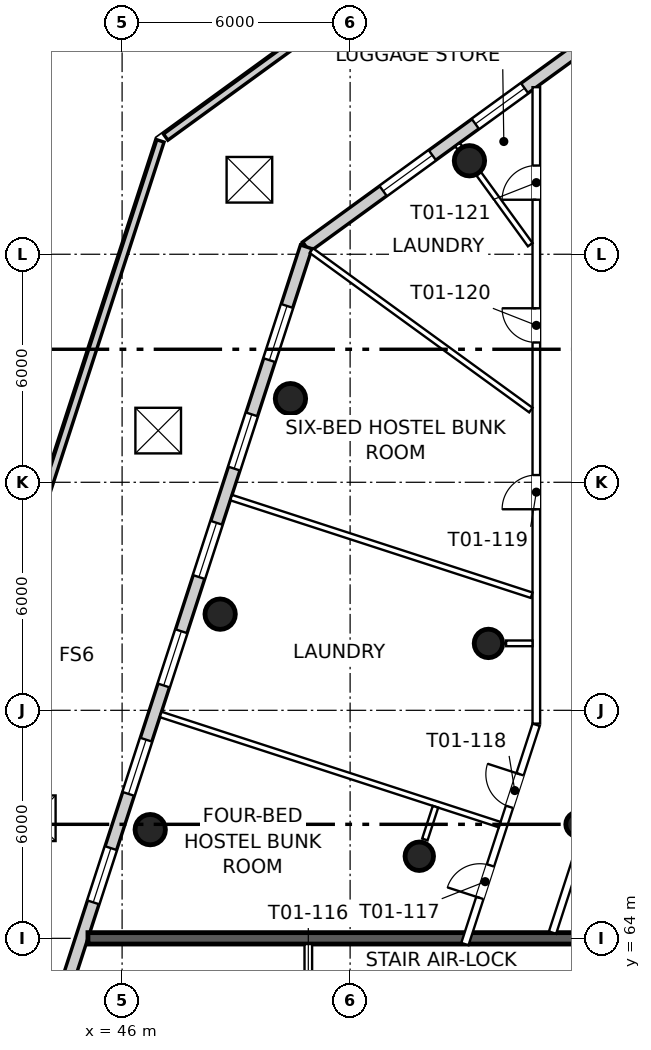
"""IFC4 building model, lengths in metres.
Left out: names, types, materials, properties, quantities, classifications, styles, units other than length and angle.
Written with IfcOpenShell. Run it as: python <this file> out.ifc"""

import sys

from ifc_helpers import new_model, si_unit, direction, frame, frame_2d, origin, origin_2d, place, context, subcontext, project, spatial, rectangle, circle, extrude, element, fill, save


model = new_model("IFC4")
c1 = context("Model", 3, precision=1e-05, world=origin(), true_north=direction((0.0, 1.0)))
c2 = subcontext(c1, "Body", "Model", "MODEL_VIEW")
j1 = project(units=[si_unit("LENGTHUNIT", "METRE"), si_unit("PLANEANGLEUNIT", "RADIAN")], contexts=[c1])
p1 = place(None, origin())
s1 = spatial("IfcSite", under=j1, at=p1, CompositionType="ELEMENT")
p2 = place(p1, origin())
s2 = spatial("IfcBuilding", under=s1, at=p2, CompositionType="ELEMENT")
p3 = place(p2, frame((0.0, 0.0, 39.0)))
s3 = spatial("IfcBuildingStorey", under=s2, at=p3, CompositionType="ELEMENT", Elevation=39.0)
for number, where, z_axis, x_axis in (
    (1, (55.14, 84.46, 0.0), (0.0, 0.0, 1.0), (1.0, 0.0, 0.0)),
    (2, (50.43, 78.2, 0.0), (0.0, 0.0, 1.0), (1.0, 0.0, 0.0)),
    (3, (48.58, 72.53, 0.0), (0.0, 0.0, 1.0), (1.0, 0.0, 0.0)),
    (4, (46.74, 66.86, 0.0), (0.0, 0.0, 1.0), (1.0, 0.0, 0.0)),
):
    element("IfcColumn", number, at=place(p3, frame(where, z_axis=z_axis, x_axis=x_axis)), inside=s3, PredefinedType="COLUMN", context=c2, shape_type="SweptSolid", body=[
        extrude(circle(Radius=0.4, at=origin_2d()), origin(), (0.0, 0.0, 1.0), 3.9),
    ])
for number, where, z_axis, x_axis in (
    (5, (55.64, 71.76, 0.0), (0.0, 0.0, 1.0), (1.0, 0.0, 0.0)),
    (6, (53.82, 66.16, 0.0), (0.0, 0.0, 1.0), (1.0, 0.0, 0.0)),
):
    element("IfcColumn", number, at=place(p3, frame(where, z_axis=z_axis, x_axis=x_axis)), inside=s3, PredefinedType="COLUMN", context=c2, shape_type="SweptSolid", body=[
        extrude(circle(Radius=0.375, at=origin_2d()), origin(), (0.0, 0.0, 1.0), 3.9),
    ])
p4 = place(p3, frame((58.0, 67.0, 0.0), z_axis=(0.0, 0.0, 1.0), x_axis=(1.0, 0.0, 0.0)))
e7 = element("IfcColumn", 7, at=p4, inside=s3, PredefinedType="COLUMN", context=c2, shape_type="SweptSolid", body=[
    extrude(circle(Radius=0.325, at=origin_2d()), origin(), (0.0, 0.0, 1.0), 3.9),
])
p5 = place(p3, frame((58.615, 87.84, 0.0), z_axis=(0.0, 0.0, 1.0), x_axis=(-0.809016299274, -0.587786209015, 0.0)))
e8 = element("IfcWall", 8, at=p5, inside=s3, PredefinedType="SOLIDWALL", context=c2, shape_type="SweptSolid", body=[
    extrude(rectangle(XDim=9.604, YDim=0.32, at=frame_2d((4.802, 0.0))), origin(), (0.0, 0.0, 1.0), 3.6),
])
p6 = place(p5, frame((2.502, 0.0, 0.9)))
e9 = element("IfcOpeningElement", 9, at=p6, cuts=e8, PredefinedType="OPENING", context=c2, shape_type="SweptSolid", body=[
    extrude(rectangle(XDim=1.6, YDim=1.8, at=frame_2d((0.8, 0.9))), frame((0.0, 0.17, 0.0), z_axis=(0.0, -1.0, 0.0), x_axis=(1.0, 0.0, 0.0)), (0.0, 0.0, 1.0), 0.34),
])
p7 = place(p5, frame((5.502, 0.0, 0.9)))
e10 = element("IfcOpeningElement", 10, at=p7, cuts=e8, PredefinedType="OPENING", context=c2, shape_type="SweptSolid", body=[
    extrude(rectangle(XDim=1.6, YDim=1.8, at=frame_2d((0.8, 0.9))), frame((0.0, 0.17, 0.0), z_axis=(0.0, -1.0, 0.0), x_axis=(1.0, 0.0, 0.0)), (0.0, 0.0, 1.0), 0.34),
])
p8 = place(p3, frame((50.845, 82.195, 0.0), z_axis=(0.0, 0.0, 1.0), x_axis=(-0.309016733543, -0.951056601045, 0.0)))
e11 = element("IfcWall", 11, at=p8, inside=s3, PredefinedType="SOLIDWALL", context=c2, shape_type="SweptSolid", body=[
    extrude(rectangle(XDim=22.77, YDim=0.32, at=frame_2d((11.385, 0.0))), origin(), (0.0, 0.0, 1.0), 3.6),
])
p9 = place(p8, frame((1.635, 0.0, 0.9)))
e12 = element("IfcOpeningElement", 12, at=p9, cuts=e11, PredefinedType="OPENING", context=c2, shape_type="SweptSolid", body=[
    extrude(rectangle(XDim=1.5, YDim=1.8, at=frame_2d((0.75, 0.9))), frame((0.0, 0.17, 0.0), z_axis=(0.0, -1.0, 0.0), x_axis=(1.0, 0.0, 0.0)), (0.0, 0.0, 1.0), 0.34),
])
p10 = place(p8, frame((4.635, 0.0, 0.9)))
e13 = element("IfcOpeningElement", 13, at=p10, cuts=e11, PredefinedType="OPENING", context=c2, shape_type="SweptSolid", body=[
    extrude(rectangle(XDim=1.5, YDim=1.8, at=frame_2d((0.75, 0.9))), frame((0.0, 0.17, 0.0), z_axis=(0.0, -1.0, 0.0), x_axis=(1.0, 0.0, 0.0)), (0.0, 0.0, 1.0), 0.34),
])
p11 = place(p8, frame((7.635, 0.0, 0.9)))
e14 = element("IfcOpeningElement", 14, at=p11, cuts=e11, PredefinedType="OPENING", context=c2, shape_type="SweptSolid", body=[
    extrude(rectangle(XDim=1.5, YDim=1.8, at=frame_2d((0.75, 0.9))), frame((0.0, 0.17, 0.0), z_axis=(0.0, -1.0, 0.0), x_axis=(1.0, 0.0, 0.0)), (0.0, 0.0, 1.0), 0.34),
])
p12 = place(p8, frame((10.635, 0.0, 0.9)))
e15 = element("IfcOpeningElement", 15, at=p12, cuts=e11, PredefinedType="OPENING", context=c2, shape_type="SweptSolid", body=[
    extrude(rectangle(XDim=1.5, YDim=1.8, at=frame_2d((0.75, 0.9))), frame((0.0, 0.17, 0.0), z_axis=(0.0, -1.0, 0.0), x_axis=(1.0, 0.0, 0.0)), (0.0, 0.0, 1.0), 0.34),
])
p13 = place(p8, frame((13.635, 0.0, 0.9)))
e16 = element("IfcOpeningElement", 16, at=p13, cuts=e11, PredefinedType="OPENING", context=c2, shape_type="SweptSolid", body=[
    extrude(rectangle(XDim=1.5, YDim=1.8, at=frame_2d((0.75, 0.9))), frame((0.0, 0.17, 0.0), z_axis=(0.0, -1.0, 0.0), x_axis=(1.0, 0.0, 0.0)), (0.0, 0.0, 1.0), 0.34),
])
p14 = place(p8, frame((16.635, 0.0, 0.9)))
e17 = element("IfcOpeningElement", 17, at=p14, cuts=e11, PredefinedType="OPENING", context=c2, shape_type="SweptSolid", body=[
    extrude(rectangle(XDim=1.5, YDim=1.8, at=frame_2d((0.75, 0.9))), frame((0.0, 0.17, 0.0), z_axis=(0.0, -1.0, 0.0), x_axis=(1.0, 0.0, 0.0)), (0.0, 0.0, 1.0), 0.34),
])
p15 = place(p3, frame((39.119, 60.701, 0.0), z_axis=(0.0, 0.0, 1.0), x_axis=(0.309015149374, 0.95105711577, 0.0)))
e18 = element("IfcWall", 18, at=p15, inside=s3, PredefinedType="SOLIDWALL", context=c2, shape_type="SweptSolid", body=[
    extrude(rectangle(XDim=25.531, YDim=0.2, at=frame_2d((12.765, 0.0))), origin(), (0.0, 0.0, 1.0), 1.1),
])
p16 = place(p3, frame((47.146, 85.082, 0.0), z_axis=(0.0, 0.0, 1.0), x_axis=(0.808991590486, 0.587820216158, 0.0)))
e19 = element("IfcWall", 19, at=p16, inside=s3, PredefinedType="SOLIDWALL", context=c2, shape_type="SweptSolid", body=[
    extrude(rectangle(XDim=4.709, YDim=0.2, at=frame_2d((2.354, 0.0))), origin(), (0.0, 0.0, 1.0), 1.1),
])
p17 = place(p3, frame((45.101, 64.0, 0.0), z_axis=(0.0, 0.0, 1.0), x_axis=(1.0, 0.0, 0.0)))
e20 = element("IfcWall", 20, at=p17, inside=s3, PredefinedType="PARTITIONING", context=c2, shape_type="SweptSolid", body=[
    extrude(rectangle(XDim=49.797, YDim=0.3, at=frame_2d((24.899, 0.0))), origin(), (0.0, 0.0, 1.0), 2.9),
])
p18 = place(p17, frame((16.433, 0.0, 0.0)))
e21 = element("IfcOpeningElement", 21, at=p18, cuts=e20, PredefinedType="OPENING", context=c2, shape_type="SweptSolid", body=[
    extrude(rectangle(XDim=2.0, YDim=2.1, at=frame_2d((1.0, 1.05))), frame((0.0, 0.16, 0.0), z_axis=(0.0, -1.0, 0.0), x_axis=(1.0, 0.0, 0.0)), (0.0, 0.0, 1.0), 0.32),
])
p19 = place(p17, frame((31.364, 0.0, 0.0)))
e22 = element("IfcOpeningElement", 22, at=p19, cuts=e20, PredefinedType="OPENING", context=c2, shape_type="SweptSolid", body=[
    extrude(rectangle(XDim=2.0, YDim=2.1, at=frame_2d((1.0, 1.05))), frame((0.0, 0.16, 0.0), z_axis=(0.0, -1.0, 0.0), x_axis=(1.0, 0.0, 0.0)), (0.0, 0.0, 1.0), 0.32),
])
p20 = place(p3, frame((55.021, 63.85, 0.0), z_axis=(0.0, 0.0, 1.0), x_axis=(0.309010538589, 0.951058613883, 0.0)))
e23 = element("IfcWall", 23, at=p20, inside=s3, PredefinedType="PARTITIONING", context=c2, shape_type="SweptSolid", body=[
    extrude(rectangle(XDim=6.066, YDim=0.2, at=frame_2d((3.033, 0.0))), origin(), (0.0, 0.0, 1.0), 3.6),
])
p21 = place(p20, frame((1.276, 0.0, 0.0)))
e24 = element("IfcOpeningElement", 24, at=p21, cuts=e23, PredefinedType="OPENING", context=c2, shape_type="SweptSolid", body=[
    extrude(rectangle(XDim=0.9, YDim=2.1, at=frame_2d((0.45, 1.05))), frame((0.0, 0.11, 0.0), z_axis=(0.0, -1.0, 0.0), x_axis=(1.0, 0.0, 0.0)), (0.0, 0.0, 1.0), 0.22),
])
p22 = place(p20, frame((3.796, 0.0, 0.0)))
e25 = element("IfcOpeningElement", 25, at=p22, cuts=e23, PredefinedType="OPENING", context=c2, shape_type="SweptSolid", body=[
    extrude(rectangle(XDim=0.9, YDim=2.1, at=frame_2d((0.45, 1.05))), frame((0.0, 0.11, 0.0), z_axis=(0.0, -1.0, 0.0), x_axis=(1.0, 0.0, 0.0)), (0.0, 0.0, 1.0), 0.22),
])
p23 = place(p3, frame((56.9, 69.65, 0.0), z_axis=(0.0, 0.0, 1.0), x_axis=(0.0, 1.0, 0.0)))
e26 = element("IfcWall", 26, at=p23, inside=s3, PredefinedType="PARTITIONING", context=c2, shape_type="SweptSolid", body=[
    extrude(rectangle(XDim=16.746, YDim=0.2, at=frame_2d((8.373, 0.0))), origin(), (0.0, 0.0, 1.0), 3.0),
])
p24 = place(p23, frame((5.64, 0.0, 0.0)))
e27 = element("IfcOpeningElement", 27, at=p24, cuts=e26, PredefinedType="OPENING", context=c2, shape_type="SweptSolid", body=[
    extrude(rectangle(XDim=0.9, YDim=2.1, at=frame_2d((0.45, 1.05))), frame((0.0, 0.11, 0.0), z_axis=(0.0, -1.0, 0.0), x_axis=(1.0, 0.0, 0.0)), (0.0, 0.0, 1.0), 0.22),
])
p25 = place(p23, frame((10.028, 0.0, 0.0)))
e28 = element("IfcOpeningElement", 28, at=p25, cuts=e26, PredefinedType="OPENING", context=c2, shape_type="SweptSolid", body=[
    extrude(rectangle(XDim=0.9, YDim=2.1, at=frame_2d((0.45, 1.05))), frame((0.0, 0.11, 0.0), z_axis=(0.0, -1.0, 0.0), x_axis=(1.0, 0.0, 0.0)), (0.0, 0.0, 1.0), 0.22),
])
p26 = place(p23, frame((13.784, 0.0, 0.0)))
e29 = element("IfcOpeningElement", 29, at=p26, cuts=e26, PredefinedType="OPENING", context=c2, shape_type="SweptSolid", body=[
    extrude(rectangle(XDim=0.9, YDim=2.1, at=frame_2d((0.45, 1.05))), frame((0.0, 0.11, 0.0), z_axis=(0.0, -1.0, 0.0), x_axis=(1.0, 0.0, 0.0)), (0.0, 0.0, 1.0), 0.22),
])
p27 = place(p3, frame((50.9, 55.9, 0.0), z_axis=(0.0, 0.0, 1.0), x_axis=(0.0, 1.0, 0.0)))
e30 = element("IfcWall", 30, at=p27, inside=s3, PredefinedType="PARTITIONING", context=c2, shape_type="SweptSolid", body=[
    extrude(rectangle(XDim=7.95, YDim=0.2, at=frame_2d((3.975, 0.0))), origin(), (0.0, 0.0, 1.0), 3.6),
])
p28 = place(p27, frame((1.82, 0.0, 0.0)))
e31 = element("IfcOpeningElement", 31, at=p28, cuts=e30, PredefinedType="OPENING", context=c2, shape_type="SweptSolid", body=[
    extrude(rectangle(XDim=0.9, YDim=2.1, at=frame_2d((0.45, 1.05))), frame((0.0, 0.11, 0.0), z_axis=(0.0, -1.0, 0.0), x_axis=(1.0, 0.0, 0.0)), (0.0, 0.0, 1.0), 0.22),
])
p29 = place(p27, frame((5.882, 0.0, 0.0)))
e32 = element("IfcOpeningElement", 32, at=p29, cuts=e30, PredefinedType="OPENING", context=c2, shape_type="SweptSolid", body=[
    extrude(rectangle(XDim=0.9, YDim=2.1, at=frame_2d((0.45, 1.05))), frame((0.0, 0.11, 0.0), z_axis=(0.0, -1.0, 0.0), x_axis=(1.0, 0.0, 0.0)), (0.0, 0.0, 1.0), 0.22),
])
p30 = place(p3, frame((58.847, 68.831, 0.0), z_axis=(0.0, 0.0, 1.0), x_axis=(-0.309031112369, -0.951051928965, 0.0)))
e33 = element("IfcWall", 33, at=p30, inside=s3, PredefinedType="PARTITIONING", context=c2, shape_type="SweptSolid", body=[
    extrude(rectangle(XDim=4.922, YDim=0.2, at=frame_2d((2.461, 0.0))), origin(), (0.0, 0.0, 1.0), 3.6),
])
p31 = place(p3, frame((50.981, 82.096, 0.0), z_axis=(0.0, 0.0, 1.0), x_axis=(0.808999272552, -0.587809643516, 0.0)))
e34 = element("IfcWall", 34, at=p31, inside=s3, PredefinedType="PARTITIONING", context=c2, shape_type="SweptSolid", body=[
    extrude(rectangle(XDim=7.138, YDim=0.15, at=frame_2d((3.569, 0.0))), origin(), (0.0, 0.0, 1.0), 3.1),
])
p32 = place(p3, frame((54.824, 84.888, 0.0), z_axis=(0.0, 0.0, 1.0), x_axis=(0.587775139739, -0.809024341479, 0.0)))
e35 = element("IfcWall", 35, at=p32, inside=s3, PredefinedType="PARTITIONING", context=c2, shape_type="SweptSolid", body=[
    extrude(rectangle(XDim=3.259, YDim=0.15, at=frame_2d((1.629, 0.0))), origin(), (0.0, 0.0, 1.0), 3.6),
])
p33 = place(p3, frame((48.87, 75.597, 0.0), z_axis=(0.0, 0.0, 1.0), x_axis=(0.95105219364, -0.309030297822, 0.0)))
e36 = element("IfcWall", 36, at=p33, inside=s3, PredefinedType="PARTITIONING", context=c2, shape_type="SweptSolid", body=[
    extrude(rectangle(XDim=8.314, YDim=0.15, at=frame_2d((4.157, 0.0))), origin(), (0.0, 0.0, 1.0), 3.1),
])
p34 = place(p3, frame((47.015, 69.891, 0.0), z_axis=(0.0, 0.0, 1.0), x_axis=(0.951060843481, -0.309003676349, 0.0)))
e37 = element("IfcWall", 37, at=p34, inside=s3, PredefinedType="PARTITIONING", context=c2, shape_type="SweptSolid", body=[
    extrude(rectangle(XDim=9.38, YDim=0.15, at=frame_2d((4.69, 0.0))), origin(), (0.0, 0.0, 1.0), 3.0),
])
p35 = place(p3, frame((56.105, 71.762, 0.0), z_axis=(0.0, 0.0, 1.0), x_axis=(1.0, 0.0, 0.0)))
e38 = element("IfcWall", 38, at=p35, inside=s3, PredefinedType="PARTITIONING", context=c2, shape_type="SweptSolid", body=[
    extrude(rectangle(XDim=0.695, YDim=0.15, at=frame_2d((0.348, 0.0))), origin(), (0.0, 0.0, 1.0), 3.0),
])
p36 = place(p3, frame((53.967, 66.601, 0.0), z_axis=(0.0, 0.0, 1.0), x_axis=(0.308939772629, 0.951081603695, 0.0)))
e39 = element("IfcWall", 39, at=p36, inside=s3, PredefinedType="PARTITIONING", context=c2, shape_type="SweptSolid", body=[
    extrude(rectangle(XDim=0.906, YDim=0.15, at=frame_2d((0.453, 0.0))), origin(), (0.0, 0.0, 1.0), 3.0),
])
p37 = place(p6, origin())
e40 = element("IfcWindow", 40, at=p37, inside=s3, PartitioningType="SINGLE_PANEL", PredefinedType="WINDOW", context=c2, shape_type="SweptSolid", body=[
    extrude(rectangle(XDim=1.6, YDim=1.8, at=frame_2d((0.8, 0.9))), frame((0.0, 0.07, 0.0), z_axis=(0.0, -1.0, 0.0), x_axis=(1.0, 0.0, 0.0)), (0.0, 0.0, 1.0), 0.06),
])
fill(e9, e40)
p38 = place(p7, origin())
e41 = element("IfcWindow", 41, at=p38, inside=s3, PartitioningType="SINGLE_PANEL", PredefinedType="WINDOW", context=c2, shape_type="SweptSolid", body=[
    extrude(rectangle(XDim=1.6, YDim=1.8, at=frame_2d((0.8, 0.9))), frame((0.0, 0.07, 0.0), z_axis=(0.0, -1.0, 0.0), x_axis=(1.0, 0.0, 0.0)), (0.0, 0.0, 1.0), 0.06),
])
fill(e10, e41)
p39 = place(p9, origin())
e42 = element("IfcWindow", 42, at=p39, inside=s3, PartitioningType="SINGLE_PANEL", PredefinedType="WINDOW", context=c2, shape_type="SweptSolid", body=[
    extrude(rectangle(XDim=1.5, YDim=1.8, at=frame_2d((0.75, 0.9))), frame((0.0, 0.07, 0.0), z_axis=(0.0, -1.0, 0.0), x_axis=(1.0, 0.0, 0.0)), (0.0, 0.0, 1.0), 0.06),
])
fill(e12, e42)
p40 = place(p10, origin())
e43 = element("IfcWindow", 43, at=p40, inside=s3, PartitioningType="SINGLE_PANEL", PredefinedType="WINDOW", context=c2, shape_type="SweptSolid", body=[
    extrude(rectangle(XDim=1.5, YDim=1.8, at=frame_2d((0.75, 0.9))), frame((0.0, 0.07, 0.0), z_axis=(0.0, -1.0, 0.0), x_axis=(1.0, 0.0, 0.0)), (0.0, 0.0, 1.0), 0.06),
])
fill(e13, e43)
p41 = place(p11, origin())
e44 = element("IfcWindow", 44, at=p41, inside=s3, PartitioningType="SINGLE_PANEL", PredefinedType="WINDOW", context=c2, shape_type="SweptSolid", body=[
    extrude(rectangle(XDim=1.5, YDim=1.8, at=frame_2d((0.75, 0.9))), frame((0.0, 0.07, 0.0), z_axis=(0.0, -1.0, 0.0), x_axis=(1.0, 0.0, 0.0)), (0.0, 0.0, 1.0), 0.06),
])
fill(e14, e44)
p42 = place(p12, origin())
e45 = element("IfcWindow", 45, at=p42, inside=s3, PartitioningType="SINGLE_PANEL", PredefinedType="WINDOW", context=c2, shape_type="SweptSolid", body=[
    extrude(rectangle(XDim=1.5, YDim=1.8, at=frame_2d((0.75, 0.9))), frame((0.0, 0.07, 0.0), z_axis=(0.0, -1.0, 0.0), x_axis=(1.0, 0.0, 0.0)), (0.0, 0.0, 1.0), 0.06),
])
fill(e15, e45)
p43 = place(p13, origin())
e46 = element("IfcWindow", 46, at=p43, inside=s3, PartitioningType="SINGLE_PANEL", PredefinedType="WINDOW", context=c2, shape_type="SweptSolid", body=[
    extrude(rectangle(XDim=1.5, YDim=1.8, at=frame_2d((0.75, 0.9))), frame((0.0, 0.07, 0.0), z_axis=(0.0, -1.0, 0.0), x_axis=(1.0, 0.0, 0.0)), (0.0, 0.0, 1.0), 0.06),
])
fill(e16, e46)
p44 = place(p14, origin())
e47 = element("IfcWindow", 47, at=p44, inside=s3, PartitioningType="SINGLE_PANEL", PredefinedType="WINDOW", context=c2, shape_type="SweptSolid", body=[
    extrude(rectangle(XDim=1.5, YDim=1.8, at=frame_2d((0.75, 0.9))), frame((0.0, 0.07, 0.0), z_axis=(0.0, -1.0, 0.0), x_axis=(1.0, 0.0, 0.0)), (0.0, 0.0, 1.0), 0.06),
])
fill(e17, e47)
p45 = place(p3, frame((0.0, 0.0, -0.4)))
p46 = place(p45, frame((43.65, 67.16, 0.0)))
p47 = place(p46, frame((0.0, 0.0, 0.35)))
e48 = element("IfcWindow", 48, at=p47, inside=s3, PartitioningType="SINGLE_PANEL", PredefinedType="SKYLIGHT", context=c2, shape_type="SweptSolid", body=[
    extrude(rectangle(XDim=1.2, YDim=1.2, at=origin_2d()), origin(), (0.0, 0.0, 1.0), 0.05),
])
p48 = place(p45, frame((46.95, 77.36, 0.0)))
p49 = place(p48, frame((0.0, 0.0, 0.35)))
e49 = element("IfcWindow", 49, at=p49, inside=s3, PartitioningType="SINGLE_PANEL", PredefinedType="SKYLIGHT", context=c2, shape_type="SweptSolid", body=[
    extrude(rectangle(XDim=1.2, YDim=1.2, at=origin_2d()), origin(), (0.0, 0.0, 1.0), 0.05),
])
p50 = place(p45, frame((49.35, 83.96, 0.0)))
p51 = place(p50, frame((0.0, 0.0, 0.35)))
e50 = element("IfcWindow", 50, at=p51, inside=s3, PartitioningType="SINGLE_PANEL", PredefinedType="SKYLIGHT", context=c2, shape_type="SweptSolid", body=[
    extrude(rectangle(XDim=1.2, YDim=1.2, at=origin_2d()), origin(), (0.0, 0.0, 1.0), 0.05),
])
p52 = place(p21, origin())
e51 = element("IfcDoor", 51, at=p52, inside=s3, OperationType="SINGLE_SWING_LEFT", PredefinedType="DOOR", context=c2, shape_type="SweptSolid", body=[
    extrude(rectangle(XDim=0.9, YDim=2.1, at=frame_2d((0.45, 1.05))), frame((0.0, 0.025, 0.0), z_axis=(0.0, -1.0, 0.0), x_axis=(1.0, 0.0, 0.0)), (0.0, 0.0, 1.0), 0.05),
])
fill(e24, e51)
p53 = place(p22, origin())
e52 = element("IfcDoor", 52, at=p53, inside=s3, OperationType="SINGLE_SWING_RIGHT", PredefinedType="DOOR", context=c2, shape_type="SweptSolid", body=[
    extrude(rectangle(XDim=0.9, YDim=2.1, at=frame_2d((0.45, 1.05))), frame((0.0, 0.025, 0.0), z_axis=(0.0, -1.0, 0.0), x_axis=(1.0, 0.0, 0.0)), (0.0, 0.0, 1.0), 0.05),
])
fill(e25, e52)
p54 = place(p24, origin())
e53 = element("IfcDoor", 53, at=p54, inside=s3, OperationType="SINGLE_SWING_LEFT", PredefinedType="DOOR", context=c2, shape_type="SweptSolid", body=[
    extrude(rectangle(XDim=0.9, YDim=2.1, at=frame_2d((0.45, 1.05))), frame((0.0, 0.025, 0.0), z_axis=(0.0, -1.0, 0.0), x_axis=(1.0, 0.0, 0.0)), (0.0, 0.0, 1.0), 0.05),
])
fill(e27, e53)
p55 = place(p25, origin())
e54 = element("IfcDoor", 54, at=p55, inside=s3, OperationType="SINGLE_SWING_RIGHT", PredefinedType="DOOR", context=c2, shape_type="SweptSolid", body=[
    extrude(rectangle(XDim=0.9, YDim=2.1, at=frame_2d((0.45, 1.05))), frame((0.0, 0.025, 0.0), z_axis=(0.0, -1.0, 0.0), x_axis=(1.0, 0.0, 0.0)), (0.0, 0.0, 1.0), 0.05),
])
fill(e28, e54)
p56 = place(p26, origin())
e55 = element("IfcDoor", 55, at=p56, inside=s3, OperationType="SINGLE_SWING_LEFT", PredefinedType="DOOR", context=c2, shape_type="SweptSolid", body=[
    extrude(rectangle(XDim=0.9, YDim=2.1, at=frame_2d((0.45, 1.05))), frame((0.0, 0.025, 0.0), z_axis=(0.0, -1.0, 0.0), x_axis=(1.0, 0.0, 0.0)), (0.0, 0.0, 1.0), 0.05),
])
fill(e29, e55)
save(model, sys.argv[1])
